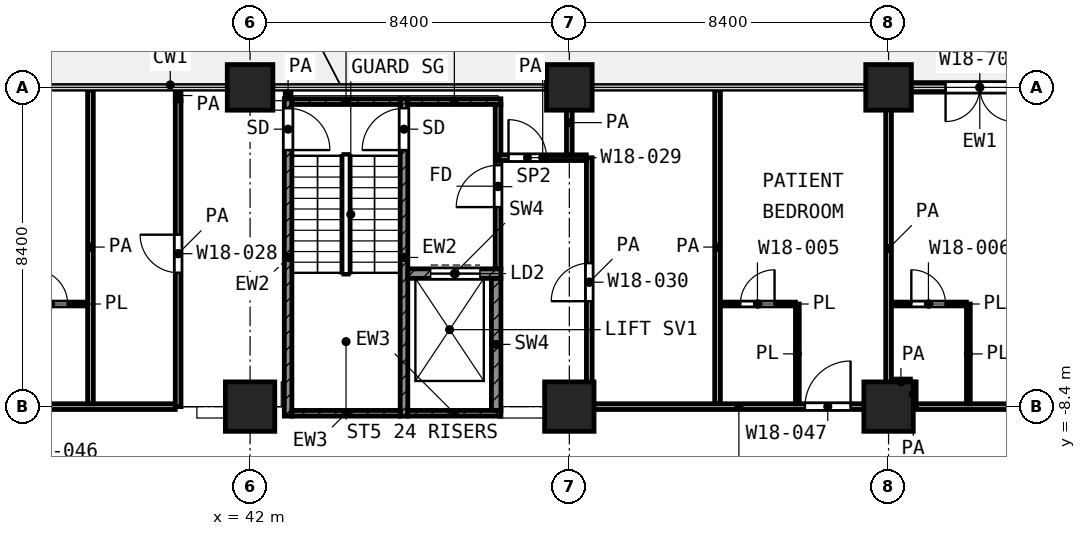
"""IFC4 building model, lengths in metres.
Left out: names, types, materials, properties, quantities, classifications, styles, units other than length and angle.
Written with IfcOpenShell. Run it as: python <this file> out.ifc"""

import sys

from ifc_helpers import new_model, si_unit, direction, frame, frame_2d, origin, origin_2d, place, context, subcontext, project, spatial, rectangle, extrude, element, fill, save


model = new_model("IFC4")
c1 = context("Model", 3, precision=1e-05, world=origin(), true_north=direction((0.0, 1.0)))
c2 = subcontext(c1, "Body", "Model", "MODEL_VIEW")
j1 = project(units=[si_unit("LENGTHUNIT", "METRE"), si_unit("PLANEANGLEUNIT", "RADIAN")], contexts=[c1])
p1 = place(None, origin())
s1 = spatial("IfcSite", under=j1, at=p1, CompositionType="ELEMENT")
p2 = place(p1, origin())
s2 = spatial("IfcBuilding", under=s1, at=p2, CompositionType="ELEMENT")
p3 = place(p2, frame((0.0, 0.0, 81.2)))
s3 = spatial("IfcBuildingStorey", under=s2, at=p3, CompositionType="ELEMENT", Elevation=81.2)
for number, where, z_axis, x_axis in (
    (1, (42.0, 0.0, 0.0), (0.0, 0.0, 1.0), (1.0, 0.0, 0.0)),
    (2, (50.4, 0.0, 0.0), (0.0, 0.0, 1.0), (1.0, 0.0, 0.0)),
    (3, (58.8, 0.0, 0.0), (0.0, 0.0, 1.0), (1.0, 0.0, 0.0)),
):
    element("IfcColumn", number, at=place(p3, frame(where, z_axis=z_axis, x_axis=x_axis)), inside=s3, PredefinedType="COLUMN", context=c2, shape_type="SweptSolid", body=[
        extrude(rectangle(XDim=1.2, YDim=1.2, at=origin_2d()), origin(), (0.0, 0.0, 1.0), 4.2),
    ])
for number, where, z_axis, x_axis in (
    (4, (42.0, -8.4, 0.0), (0.0, 0.0, 1.0), (1.0, 0.0, 0.0)),
    (5, (50.4, -8.4, 0.0), (0.0, 0.0, 1.0), (1.0, 0.0, 0.0)),
    (6, (58.8, -8.4, 0.0), (0.0, 0.0, 1.0), (1.0, 0.0, 0.0)),
):
    element("IfcColumn", number, at=place(p3, frame(where, z_axis=z_axis, x_axis=x_axis)), inside=s3, PredefinedType="COLUMN", context=c2, shape_type="SweptSolid", body=[
        extrude(rectangle(XDim=1.3, YDim=1.3, at=origin_2d()), origin(), (0.0, 0.0, 1.0), 4.2),
    ])
p4 = place(p3, frame((63.0, 0.0, 0.0), z_axis=(0.0, 0.0, 1.0), x_axis=(-1.0, 0.0, 0.0)))
e7 = element("IfcWall", 7, at=p4, inside=s3, PredefinedType="SOLIDWALL", context=c2, shape_type="SweptSolid", body=[
    extrude(rectangle(XDim=3.6, YDim=0.25, at=frame_2d((1.8, 0.0))), origin(), (0.0, 0.0, 1.0), 3.78),
])
p5 = place(p4, frame((0.9, 0.0, 0.0)))
e8 = element("IfcOpeningElement", 8, at=p5, cuts=e7, PredefinedType="OPENING", context=c2, shape_type="SweptSolid", body=[
    extrude(rectangle(XDim=1.8, YDim=2.1, at=frame_2d((0.9, 1.05))), frame((0.0, 0.135, 0.0), z_axis=(0.0, -1.0, 0.0), x_axis=(1.0, 0.0, 0.0)), (0.0, 0.0, 1.0), 0.27),
])
p6 = place(p3, frame((43.0, -8.65, 0.0), z_axis=(0.0, 0.0, 1.0), x_axis=(0.0, 1.0, 0.0)))
e9 = element("IfcWall", 9, at=p6, inside=s3, PredefinedType="SHEAR", context=c2, shape_type="SweptSolid", body=[
    extrude(rectangle(XDim=8.35, YDim=0.2, at=frame_2d((4.175, 0.0))), origin(), (0.0, 0.0, 1.0), 3.9),
])
p7 = place(p6, frame((7.0, 0.0, 0.0)))
e10 = element("IfcOpeningElement", 10, at=p7, cuts=e9, PredefinedType="OPENING", context=c2, shape_type="SweptSolid", body=[
    extrude(rectangle(XDim=1.1, YDim=2.1, at=frame_2d((0.55, 1.05))), frame((0.0, 0.11, 0.0), z_axis=(0.0, -1.0, 0.0), x_axis=(1.0, 0.0, 0.0)), (0.0, 0.0, 1.0), 0.22),
])
p8 = place(p3, frame((46.05, -8.65, 0.0), z_axis=(0.0, 0.0, 1.0), x_axis=(0.0, 1.0, 0.0)))
e11 = element("IfcWall", 11, at=p8, inside=s3, PredefinedType="SHEAR", context=c2, shape_type="SweptSolid", body=[
    extrude(rectangle(XDim=8.35, YDim=0.2, at=frame_2d((4.175, 0.0))), origin(), (0.0, 0.0, 1.0), 3.9),
])
p9 = place(p8, frame((7.0, 0.0, 0.0)))
e12 = element("IfcOpeningElement", 12, at=p9, cuts=e11, PredefinedType="OPENING", context=c2, shape_type="SweptSolid", body=[
    extrude(rectangle(XDim=1.1, YDim=2.1, at=frame_2d((0.55, 1.05))), frame((0.0, 0.11, 0.0), z_axis=(0.0, -1.0, 0.0), x_axis=(1.0, 0.0, 0.0)), (0.0, 0.0, 1.0), 0.22),
])
p10 = place(p3, frame((43.1, -0.375, 0.0), z_axis=(0.0, 0.0, 1.0), x_axis=(1.0, 0.0, 0.0)))
e13 = element("IfcWall", 13, at=p10, inside=s3, PredefinedType="SHEAR", context=c2, shape_type="SweptSolid", body=[
    extrude(rectangle(XDim=2.85, YDim=0.15, at=frame_2d((1.425, 0.0))), origin(), (0.0, 0.0, 1.0), 3.9),
])
p11 = place(p3, frame((46.15, -0.375, 0.0), z_axis=(0.0, 0.0, 1.0), x_axis=(1.0, 0.0, 0.0)))
e14 = element("IfcWall", 14, at=p11, inside=s3, PredefinedType="SHEAR", context=c2, shape_type="SweptSolid", body=[
    extrude(rectangle(XDim=2.45, YDim=0.15, at=frame_2d((1.225, 0.0))), origin(), (0.0, 0.0, 1.0), 3.9),
])
p12 = place(p3, frame((43.1, -8.575, 0.0), z_axis=(0.0, 0.0, 1.0), x_axis=(1.0, 0.0, 0.0)))
e15 = element("IfcWall", 15, at=p12, inside=s3, PredefinedType="SHEAR", context=c2, shape_type="SweptSolid", body=[
    extrude(rectangle(XDim=2.85, YDim=0.15, at=frame_2d((1.425, 0.0))), origin(), (0.0, 0.0, 1.0), 3.9),
])
p13 = place(p3, frame((46.15, -8.575, 0.0), z_axis=(0.0, 0.0, 1.0), x_axis=(1.0, 0.0, 0.0)))
e16 = element("IfcWall", 16, at=p13, inside=s3, PredefinedType="SHEAR", context=c2, shape_type="SweptSolid", body=[
    extrude(rectangle(XDim=2.45, YDim=0.15, at=frame_2d((1.225, 0.0))), origin(), (0.0, 0.0, 1.0), 3.9),
])
p14 = place(p3, frame((46.15, -4.9, 0.0), z_axis=(0.0, 0.0, 1.0), x_axis=(1.0, 0.0, 0.0)))
e17 = element("IfcWall", 17, at=p14, inside=s3, PredefinedType="SHEAR", context=c2, shape_type="SweptSolid", body=[
    extrude(rectangle(XDim=2.45, YDim=0.25, at=frame_2d((1.225, 0.0))), origin(), (0.0, 0.0, 1.0), 3.9),
])
p15 = place(p14, frame((0.6, 0.0, 0.0)))
e18 = element("IfcOpeningElement", 18, at=p15, cuts=e17, PredefinedType="OPENING", context=c2, shape_type="SweptSolid", body=[
    extrude(rectangle(XDim=1.3, YDim=2.1, at=frame_2d((0.65, 1.05))), frame((0.0, 0.135, 0.0), z_axis=(0.0, -1.0, 0.0), x_axis=(1.0, 0.0, 0.0)), (0.0, 0.0, 1.0), 0.27),
])
p16 = place(p3, frame((48.475, -8.5, 0.0), z_axis=(0.0, 0.0, 1.0), x_axis=(0.0, 1.0, 0.0)))
e19 = element("IfcWall", 19, at=p16, inside=s3, PredefinedType="SHEAR", context=c2, shape_type="SweptSolid", body=[
    extrude(rectangle(XDim=3.475, YDim=0.25, at=frame_2d((1.738, 0.0))), origin(), (0.0, 0.0, 1.0), 3.9),
])
p17 = place(p3, frame((48.525, -4.775, 0.0), z_axis=(0.0, 0.0, 1.0), x_axis=(0.0, 1.0, 0.0)))
e20 = element("IfcWall", 20, at=p17, inside=s3, PredefinedType="PARTITIONING", context=c2, shape_type="SweptSolid", body=[
    extrude(rectangle(XDim=4.325, YDim=0.15, at=frame_2d((2.163, 0.0))), origin(), (0.0, 0.0, 1.0), 3.9),
])
p18 = place(p17, frame((1.625, 0.0, 0.0)))
e21 = element("IfcOpeningElement", 21, at=p18, cuts=e20, PredefinedType="OPENING", context=c2, shape_type="SweptSolid", body=[
    extrude(rectangle(XDim=1.1, YDim=2.1, at=frame_2d((0.55, 1.05))), frame((0.0, 0.085, 0.0), z_axis=(0.0, -1.0, 0.0), x_axis=(1.0, 0.0, 0.0)), (0.0, 0.0, 1.0), 0.17),
])
p19 = place(p3, frame((35.75, -5.7, 0.0), z_axis=(0.0, 0.0, 1.0), x_axis=(1.0, 0.0, 0.0)))
e22 = element("IfcWall", 22, at=p19, inside=s3, PredefinedType="PARTITIONING", context=c2, shape_type="SweptSolid", body=[
    extrude(rectangle(XDim=1.975, YDim=0.1, at=frame_2d((0.988, 0.0))), origin(), (0.0, 0.0, 1.0), 3.9),
])
p20 = place(p19, frame((0.55, 0.0, 0.0)))
e23 = element("IfcOpeningElement", 23, at=p20, cuts=e22, PredefinedType="OPENING", context=c2, shape_type="SweptSolid", body=[
    extrude(rectangle(XDim=0.9, YDim=2.1, at=frame_2d((0.45, 1.05))), frame((0.0, 0.06, 0.0), z_axis=(0.0, -1.0, 0.0), x_axis=(1.0, 0.0, 0.0)), (0.0, 0.0, 1.0), 0.12),
])
p21 = place(p3, frame((54.375, -5.7, 0.0), z_axis=(0.0, 0.0, 1.0), x_axis=(1.0, 0.0, 0.0)))
e24 = element("IfcWall", 24, at=p21, inside=s3, PredefinedType="PARTITIONING", context=c2, shape_type="SweptSolid", body=[
    extrude(rectangle(XDim=1.975, YDim=0.1, at=frame_2d((0.988, 0.0))), origin(), (0.0, 0.0, 1.0), 3.9),
])
p22 = place(p21, frame((0.525, 0.0, 0.0)))
e25 = element("IfcOpeningElement", 25, at=p22, cuts=e24, PredefinedType="OPENING", context=c2, shape_type="SweptSolid", body=[
    extrude(rectangle(XDim=0.9, YDim=2.1, at=frame_2d((0.45, 1.05))), frame((0.0, 0.06, 0.0), z_axis=(0.0, -1.0, 0.0), x_axis=(1.0, 0.0, 0.0)), (0.0, 0.0, 1.0), 0.12),
])
p23 = place(p3, frame((58.875, -5.7, 0.0), z_axis=(0.0, 0.0, 1.0), x_axis=(1.0, 0.0, 0.0)))
e26 = element("IfcWall", 26, at=p23, inside=s3, PredefinedType="PARTITIONING", context=c2, shape_type="SweptSolid", body=[
    extrude(rectangle(XDim=1.973, YDim=0.1, at=frame_2d((0.986, 0.0))), origin(), (0.0, 0.0, 1.0), 3.9),
])
p24 = place(p23, frame((0.524, 0.0, 0.0)))
e27 = element("IfcOpeningElement", 27, at=p24, cuts=e26, PredefinedType="OPENING", context=c2, shape_type="SweptSolid", body=[
    extrude(rectangle(XDim=0.9, YDim=2.1, at=frame_2d((0.45, 1.05))), frame((0.0, 0.06, 0.0), z_axis=(0.0, -1.0, 0.0), x_axis=(1.0, 0.0, 0.0)), (0.0, 0.0, 1.0), 0.12),
])
p25 = place(p3, frame((56.4, -8.325, 0.0), z_axis=(0.0, 0.0, 1.0), x_axis=(0.0, 1.0, 0.0)))
e28 = element("IfcWall", 28, at=p25, inside=s3, PredefinedType="PARTITIONING", context=c2, shape_type="SweptSolid", body=[
    extrude(rectangle(XDim=2.625, YDim=0.1, at=frame_2d((1.312, 0.0))), origin(), (0.0, 0.0, 1.0), 3.9),
])
p26 = place(p3, frame((60.9, -8.325, 0.0), z_axis=(0.0, 0.0, 1.0), x_axis=(0.0, 1.0, 0.0)))
e29 = element("IfcWall", 29, at=p26, inside=s3, PredefinedType="PARTITIONING", context=c2, shape_type="SweptSolid", body=[
    extrude(rectangle(XDim=2.624, YDim=0.1, at=frame_2d((1.312, 0.0))), origin(), (0.0, 0.0, 1.0), 3.9),
])
p27 = place(p3, frame((25.1, -8.4, 0.0), z_axis=(0.0, 0.0, 1.0), x_axis=(1.0, 0.0, 0.0)))
e30 = element("IfcWall", 30, at=p27, inside=s3, PredefinedType="PARTITIONING", context=c2, shape_type="SweptSolid", body=[
    extrude(rectangle(XDim=14.932, YDim=0.15, at=frame_2d((7.466, 0.0))), origin(), (0.0, 0.0, 1.0), 3.9),
])
p28 = place(p27, frame((1.4, 0.0, 0.0)))
e31 = element("IfcOpeningElement", 31, at=p28, cuts=e30, PredefinedType="OPENING", context=c2, shape_type="SweptSolid", body=[
    extrude(rectangle(XDim=1.0, YDim=2.1, at=frame_2d((0.5, 1.05))), frame((0.0, 0.085, 0.0), z_axis=(0.0, -1.0, 0.0), x_axis=(1.0, 0.0, 0.0)), (0.0, 0.0, 1.0), 0.17),
])
p29 = place(p27, frame((6.1, 0.0, 0.0)))
e32 = element("IfcOpeningElement", 32, at=p29, cuts=e30, PredefinedType="OPENING", context=c2, shape_type="SweptSolid", body=[
    extrude(rectangle(XDim=1.2, YDim=2.1, at=frame_2d((0.6, 1.05))), frame((0.0, 0.085, 0.0), z_axis=(0.0, -1.0, 0.0), x_axis=(1.0, 0.0, 0.0)), (0.0, 0.0, 1.0), 0.17),
])
p30 = place(p27, frame((9.2, 0.0, 0.0)))
e33 = element("IfcOpeningElement", 33, at=p30, cuts=e30, PredefinedType="OPENING", context=c2, shape_type="SweptSolid", body=[
    extrude(rectangle(XDim=1.2, YDim=2.1, at=frame_2d((0.6, 1.05))), frame((0.0, 0.085, 0.0), z_axis=(0.0, -1.0, 0.0), x_axis=(1.0, 0.0, 0.0)), (0.0, 0.0, 1.0), 0.17),
])
p31 = place(p3, frame((51.0, -8.4, 0.0), z_axis=(0.0, 0.0, 1.0), x_axis=(1.0, 0.0, 0.0)))
e34 = element("IfcWall", 34, at=p31, inside=s3, PredefinedType="PARTITIONING", context=c2, shape_type="SweptSolid", body=[
    extrude(rectangle(XDim=7.723, YDim=0.15, at=frame_2d((3.861, 0.0))), origin(), (0.0, 0.0, 1.0), 3.9),
])
p32 = place(p31, frame((5.6, 0.0, 0.0)))
e35 = element("IfcOpeningElement", 35, at=p32, cuts=e34, PredefinedType="OPENING", context=c2, shape_type="SweptSolid", body=[
    extrude(rectangle(XDim=1.2, YDim=2.1, at=frame_2d((0.6, 1.05))), frame((0.0, 0.085, 0.0), z_axis=(0.0, -1.0, 0.0), x_axis=(1.0, 0.0, 0.0)), (0.0, 0.0, 1.0), 0.17),
])
p33 = place(p3, frame((59.527, -8.4, 0.0), z_axis=(0.0, 0.0, 1.0), x_axis=(1.0, 0.0, 0.0)))
e36 = element("IfcWall", 36, at=p33, inside=s3, PredefinedType="PARTITIONING", context=c2, shape_type="SweptSolid", body=[
    extrude(rectangle(XDim=20.193, YDim=0.15, at=frame_2d((10.096, 0.0))), origin(), (0.0, 0.0, 1.0), 3.9),
])
p34 = place(p33, frame((4.073, 0.0, 0.0)))
e37 = element("IfcOpeningElement", 37, at=p34, cuts=e36, PredefinedType="OPENING", context=c2, shape_type="SweptSolid", body=[
    extrude(rectangle(XDim=1.2, YDim=2.1, at=frame_2d((0.6, 1.05))), frame((0.0, 0.085, 0.0), z_axis=(0.0, -1.0, 0.0), x_axis=(1.0, 0.0, 0.0)), (0.0, 0.0, 1.0), 0.17),
])
p35 = place(p33, frame((8.373, 0.0, 0.0)))
e38 = element("IfcOpeningElement", 38, at=p35, cuts=e36, PredefinedType="OPENING", context=c2, shape_type="SweptSolid", body=[
    extrude(rectangle(XDim=1.2, YDim=2.1, at=frame_2d((0.6, 1.05))), frame((0.0, 0.085, 0.0), z_axis=(0.0, -1.0, 0.0), x_axis=(1.0, 0.0, 0.0)), (0.0, 0.0, 1.0), 0.17),
])
p36 = place(p33, frame((13.673, 0.0, 0.0)))
e39 = element("IfcOpeningElement", 39, at=p36, cuts=e36, PredefinedType="OPENING", context=c2, shape_type="SweptSolid", body=[
    extrude(rectangle(XDim=1.2, YDim=2.1, at=frame_2d((0.6, 1.05))), frame((0.0, 0.085, 0.0), z_axis=(0.0, -1.0, 0.0), x_axis=(1.0, 0.0, 0.0)), (0.0, 0.0, 1.0), 0.17),
])
p37 = place(p33, frame((17.673, 0.0, 0.0)))
e40 = element("IfcOpeningElement", 40, at=p37, cuts=e36, PredefinedType="OPENING", context=c2, shape_type="SweptSolid", body=[
    extrude(rectangle(XDim=1.0, YDim=2.1, at=frame_2d((0.5, 1.05))), frame((0.0, 0.085, 0.0), z_axis=(0.0, -1.0, 0.0), x_axis=(1.0, 0.0, 0.0)), (0.0, 0.0, 1.0), 0.17),
])
p38 = place(p3, frame((58.875, -7.75, 0.0), z_axis=(0.0, 0.0, 1.0), x_axis=(1.0, 0.0, 0.0)))
e41 = element("IfcWall", 41, at=p38, inside=s3, PredefinedType="PARTITIONING", context=c2, shape_type="SweptSolid", body=[
    extrude(rectangle(XDim=0.5, YDim=0.15, at=frame_2d((0.25, 0.0))), origin(), (0.0, 0.0, 1.0), 3.9),
])
p39 = place(p3, frame((48.55, -1.85, 0.0), z_axis=(0.0, 0.0, 1.0), x_axis=(1.0, 0.0, 0.0)))
e42 = element("IfcWall", 42, at=p39, inside=s3, PredefinedType="PARTITIONING", context=c2, shape_type="SweptSolid", body=[
    extrude(rectangle(XDim=2.298, YDim=0.15, at=frame_2d((1.149, 0.0))), origin(), (0.0, 0.0, 1.0), 3.9),
])
p40 = place(p39, frame((0.25, 0.0, 0.0)))
e43 = element("IfcOpeningElement", 43, at=p40, cuts=e42, PredefinedType="OPENING", context=c2, shape_type="SweptSolid", body=[
    extrude(rectangle(XDim=1.0, YDim=2.1, at=frame_2d((0.5, 1.05))), frame((0.0, 0.085, 0.0), z_axis=(0.0, -1.0, 0.0), x_axis=(1.0, 0.0, 0.0)), (0.0, 0.0, 1.0), 0.17),
])
p41 = place(p3, frame((37.8, -8.325, 0.0), z_axis=(0.0, 0.0, 1.0), x_axis=(0.0, 1.0, 0.0)))
e44 = element("IfcWall", 44, at=p41, inside=s3, PredefinedType="PARTITIONING", context=c2, shape_type="SweptSolid", body=[
    extrude(rectangle(XDim=8.245, YDim=0.15, at=frame_2d((4.123, 0.0))), origin(), (0.0, 0.0, 1.0), 3.9),
])
p42 = place(p3, frame((40.107, -8.4, 0.0), z_axis=(0.0, 0.0, 1.0), x_axis=(0.0, 1.0, 0.0)))
e45 = element("IfcWall", 45, at=p42, inside=s3, PredefinedType="PARTITIONING", context=c2, shape_type="SweptSolid", body=[
    extrude(rectangle(XDim=8.048, YDim=0.15, at=frame_2d((4.024, 0.0))), origin(), (0.0, 0.0, 1.0), 3.9),
])
p43 = place(p42, frame((3.524, 0.0, 0.0)))
e46 = element("IfcOpeningElement", 46, at=p43, cuts=e45, PredefinedType="OPENING", context=c2, shape_type="SweptSolid", body=[
    extrude(rectangle(XDim=1.0, YDim=2.1, at=frame_2d((0.5, 1.05))), frame((0.0, 0.085, 0.0), z_axis=(0.0, -1.0, 0.0), x_axis=(1.0, 0.0, 0.0)), (0.0, 0.0, 1.0), 0.17),
])
p44 = place(p3, frame((40.107, -0.35, 0.0), z_axis=(0.0, 0.0, 1.0), x_axis=(0.0, 1.0, 0.0)))
e47 = element("IfcWall", 47, at=p44, inside=s3, PredefinedType="PARTITIONING", context=c2, shape_type="SweptSolid", body=[
    extrude(rectangle(XDim=0.27, YDim=0.15, at=frame_2d((0.135, 0.0))), origin(), (0.0, 0.0, 1.0), 3.9),
])
p45 = place(p3, frame((43.0, -0.27, 0.0), z_axis=(0.0, 0.0, 1.0), x_axis=(0.0, 1.0, 0.0)))
e48 = element("IfcWall", 48, at=p45, inside=s3, PredefinedType="PARTITIONING", context=c2, shape_type="SweptSolid", body=[
    extrude(rectangle(XDim=0.19, YDim=0.15, at=frame_2d((0.095, 0.0))), origin(), (0.0, 0.0, 1.0), 3.9),
])
p46 = place(p3, frame((50.4, -1.775, 0.0), z_axis=(0.0, 0.0, 1.0), x_axis=(0.0, 1.0, 0.0)))
e49 = element("IfcWall", 49, at=p46, inside=s3, PredefinedType="PARTITIONING", context=c2, shape_type="SweptSolid", body=[
    extrude(rectangle(XDim=1.695, YDim=0.15, at=frame_2d((0.847, 0.0))), origin(), (0.0, 0.0, 1.0), 3.9),
])
p47 = place(p3, frame((50.925, -8.4, 0.0), z_axis=(0.0, 0.0, 1.0), x_axis=(0.0, 1.0, 0.0)))
e50 = element("IfcWall", 50, at=p47, inside=s3, PredefinedType="PARTITIONING", context=c2, shape_type="SweptSolid", body=[
    extrude(rectangle(XDim=6.548, YDim=0.15, at=frame_2d((3.274, 0.0))), origin(), (0.0, 0.0, 1.0), 3.9),
])
p48 = place(p47, frame((2.774, 0.0, 0.0)))
e51 = element("IfcOpeningElement", 51, at=p48, cuts=e50, PredefinedType="OPENING", context=c2, shape_type="SweptSolid", body=[
    extrude(rectangle(XDim=1.0, YDim=2.1, at=frame_2d((0.5, 1.05))), frame((0.0, 0.085, 0.0), z_axis=(0.0, -1.0, 0.0), x_axis=(1.0, 0.0, 0.0)), (0.0, 0.0, 1.0), 0.17),
])
p49 = place(p3, frame((54.3, -8.325, 0.0), z_axis=(0.0, 0.0, 1.0), x_axis=(0.0, 1.0, 0.0)))
e52 = element("IfcWall", 52, at=p49, inside=s3, PredefinedType="PARTITIONING", context=c2, shape_type="SweptSolid", body=[
    extrude(rectangle(XDim=8.245, YDim=0.15, at=frame_2d((4.123, 0.0))), origin(), (0.0, 0.0, 1.0), 3.9),
])
p50 = place(p3, frame((58.8, -8.398, 0.0), z_axis=(0.0, 0.0, 1.0), x_axis=(0.0, 1.0, 0.0)))
e53 = element("IfcWall", 53, at=p50, inside=s3, PredefinedType="PARTITIONING", context=c2, shape_type="SweptSolid", body=[
    extrude(rectangle(XDim=8.318, YDim=0.15, at=frame_2d((4.159, 0.0))), origin(), (0.0, 0.0, 1.0), 3.9),
])
p51 = place(p3, frame((59.45, -8.398, 0.0), z_axis=(0.0, 0.0, 1.0), x_axis=(0.0, 1.0, 0.0)))
e54 = element("IfcWall", 54, at=p51, inside=s3, PredefinedType="PARTITIONING", context=c2, shape_type="SweptSolid", body=[
    extrude(rectangle(XDim=0.648, YDim=0.15, at=frame_2d((0.324, 0.0))), origin(), (0.0, 0.0, 1.0), 3.9),
])
p52 = place(p5, origin())
e55 = element("IfcDoor", 55, at=p52, inside=s3, OperationType="DOUBLE_DOOR_SINGLE_SWING", PredefinedType="DOOR", context=c2, shape_type="SweptSolid", body=[
    extrude(rectangle(XDim=1.8, YDim=2.1, at=frame_2d((0.9, 1.05))), frame((0.0, 0.025, 0.0), z_axis=(0.0, -1.0, 0.0), x_axis=(1.0, 0.0, 0.0)), (0.0, 0.0, 1.0), 0.05),
])
fill(e8, e55)
p53 = place(p7, frame((1.1, 0.0, 0.0), z_axis=(0.0, 0.0, 1.0), x_axis=(-1.0, 0.0, 0.0)))
e56 = element("IfcDoor", 56, at=p53, inside=s3, OperationType="SINGLE_SWING_LEFT", PredefinedType="DOOR", context=c2, shape_type="SweptSolid", body=[
    extrude(rectangle(XDim=1.1, YDim=2.1, at=frame_2d((0.55, 1.05))), frame((0.0, 0.025, 0.0), z_axis=(0.0, -1.0, 0.0), x_axis=(1.0, 0.0, 0.0)), (0.0, 0.0, 1.0), 0.05),
])
fill(e10, e56)
p54 = place(p9, origin())
e57 = element("IfcDoor", 57, at=p54, inside=s3, OperationType="SINGLE_SWING_LEFT", PredefinedType="DOOR", context=c2, shape_type="SweptSolid", body=[
    extrude(rectangle(XDim=1.1, YDim=2.1, at=frame_2d((0.55, 1.05))), frame((0.0, 0.025, 0.0), z_axis=(0.0, -1.0, 0.0), x_axis=(1.0, 0.0, 0.0)), (0.0, 0.0, 1.0), 0.05),
])
fill(e12, e57)
p55 = place(p15, origin())
e58 = element("IfcDoor", 58, at=p55, inside=s3, OperationType="DOUBLE_DOOR_SLIDING", PredefinedType="DOOR", context=c2, shape_type="SweptSolid", body=[
    extrude(rectangle(XDim=1.3, YDim=2.1, at=frame_2d((0.65, 1.05))), frame((0.0, 0.025, 0.0), z_axis=(0.0, -1.0, 0.0), x_axis=(1.0, 0.0, 0.0)), (0.0, 0.0, 1.0), 0.05),
])
fill(e18, e58)
p56 = place(p18, origin())
e59 = element("IfcDoor", 59, at=p56, inside=s3, OperationType="SINGLE_SWING_LEFT", PredefinedType="DOOR", context=c2, shape_type="SweptSolid", body=[
    extrude(rectangle(XDim=1.1, YDim=2.1, at=frame_2d((0.55, 1.05))), frame((0.0, 0.025, 0.0), z_axis=(0.0, -1.0, 0.0), x_axis=(1.0, 0.0, 0.0)), (0.0, 0.0, 1.0), 0.05),
])
fill(e21, e59)
p57 = place(p20, origin())
e60 = element("IfcDoor", 60, at=p57, inside=s3, OperationType="SINGLE_SWING_LEFT", PredefinedType="DOOR", context=c2, shape_type="SweptSolid", body=[
    extrude(rectangle(XDim=0.9, YDim=2.1, at=frame_2d((0.45, 1.05))), frame((0.0, 0.025, 0.0), z_axis=(0.0, -1.0, 0.0), x_axis=(1.0, 0.0, 0.0)), (0.0, 0.0, 1.0), 0.05),
])
fill(e23, e60)
p58 = place(p43, origin())
e61 = element("IfcDoor", 61, at=p58, inside=s3, OperationType="SINGLE_SWING_RIGHT", PredefinedType="DOOR", context=c2, shape_type="SweptSolid", body=[
    extrude(rectangle(XDim=1.0, YDim=2.1, at=frame_2d((0.5, 1.05))), frame((0.0, 0.025, 0.0), z_axis=(0.0, -1.0, 0.0), x_axis=(1.0, 0.0, 0.0)), (0.0, 0.0, 1.0), 0.05),
])
fill(e46, e61)
p59 = place(p40, origin())
e62 = element("IfcDoor", 62, at=p59, inside=s3, OperationType="SINGLE_SWING_LEFT", PredefinedType="DOOR", context=c2, shape_type="SweptSolid", body=[
    extrude(rectangle(XDim=1.0, YDim=2.1, at=frame_2d((0.5, 1.05))), frame((0.0, 0.025, 0.0), z_axis=(0.0, -1.0, 0.0), x_axis=(1.0, 0.0, 0.0)), (0.0, 0.0, 1.0), 0.05),
])
fill(e43, e62)
p60 = place(p48, origin())
e63 = element("IfcDoor", 63, at=p60, inside=s3, OperationType="SINGLE_SWING_LEFT", PredefinedType="DOOR", context=c2, shape_type="SweptSolid", body=[
    extrude(rectangle(XDim=1.0, YDim=2.1, at=frame_2d((0.5, 1.05))), frame((0.0, 0.025, 0.0), z_axis=(0.0, -1.0, 0.0), x_axis=(1.0, 0.0, 0.0)), (0.0, 0.0, 1.0), 0.05),
])
fill(e51, e63)
p61 = place(p32, origin())
e64 = element("IfcDoor", 64, at=p61, inside=s3, OperationType="SINGLE_SWING_RIGHT", PredefinedType="DOOR", context=c2, shape_type="SweptSolid", body=[
    extrude(rectangle(XDim=1.2, YDim=2.1, at=frame_2d((0.6, 1.05))), frame((0.0, 0.025, 0.0), z_axis=(0.0, -1.0, 0.0), x_axis=(1.0, 0.0, 0.0)), (0.0, 0.0, 1.0), 0.05),
])
fill(e35, e64)
p62 = place(p22, origin())
e65 = element("IfcDoor", 65, at=p62, inside=s3, OperationType="SINGLE_SWING_RIGHT", PredefinedType="DOOR", context=c2, shape_type="SweptSolid", body=[
    extrude(rectangle(XDim=0.9, YDim=2.1, at=frame_2d((0.45, 1.05))), frame((0.0, 0.025, 0.0), z_axis=(0.0, -1.0, 0.0), x_axis=(1.0, 0.0, 0.0)), (0.0, 0.0, 1.0), 0.05),
])
fill(e25, e65)
p63 = place(p24, origin())
e66 = element("IfcDoor", 66, at=p63, inside=s3, OperationType="SINGLE_SWING_LEFT", PredefinedType="DOOR", context=c2, shape_type="SweptSolid", body=[
    extrude(rectangle(XDim=0.9, YDim=2.1, at=frame_2d((0.45, 1.05))), frame((0.0, 0.025, 0.0), z_axis=(0.0, -1.0, 0.0), x_axis=(1.0, 0.0, 0.0)), (0.0, 0.0, 1.0), 0.05),
])
fill(e27, e66)
save(model, sys.argv[1])
